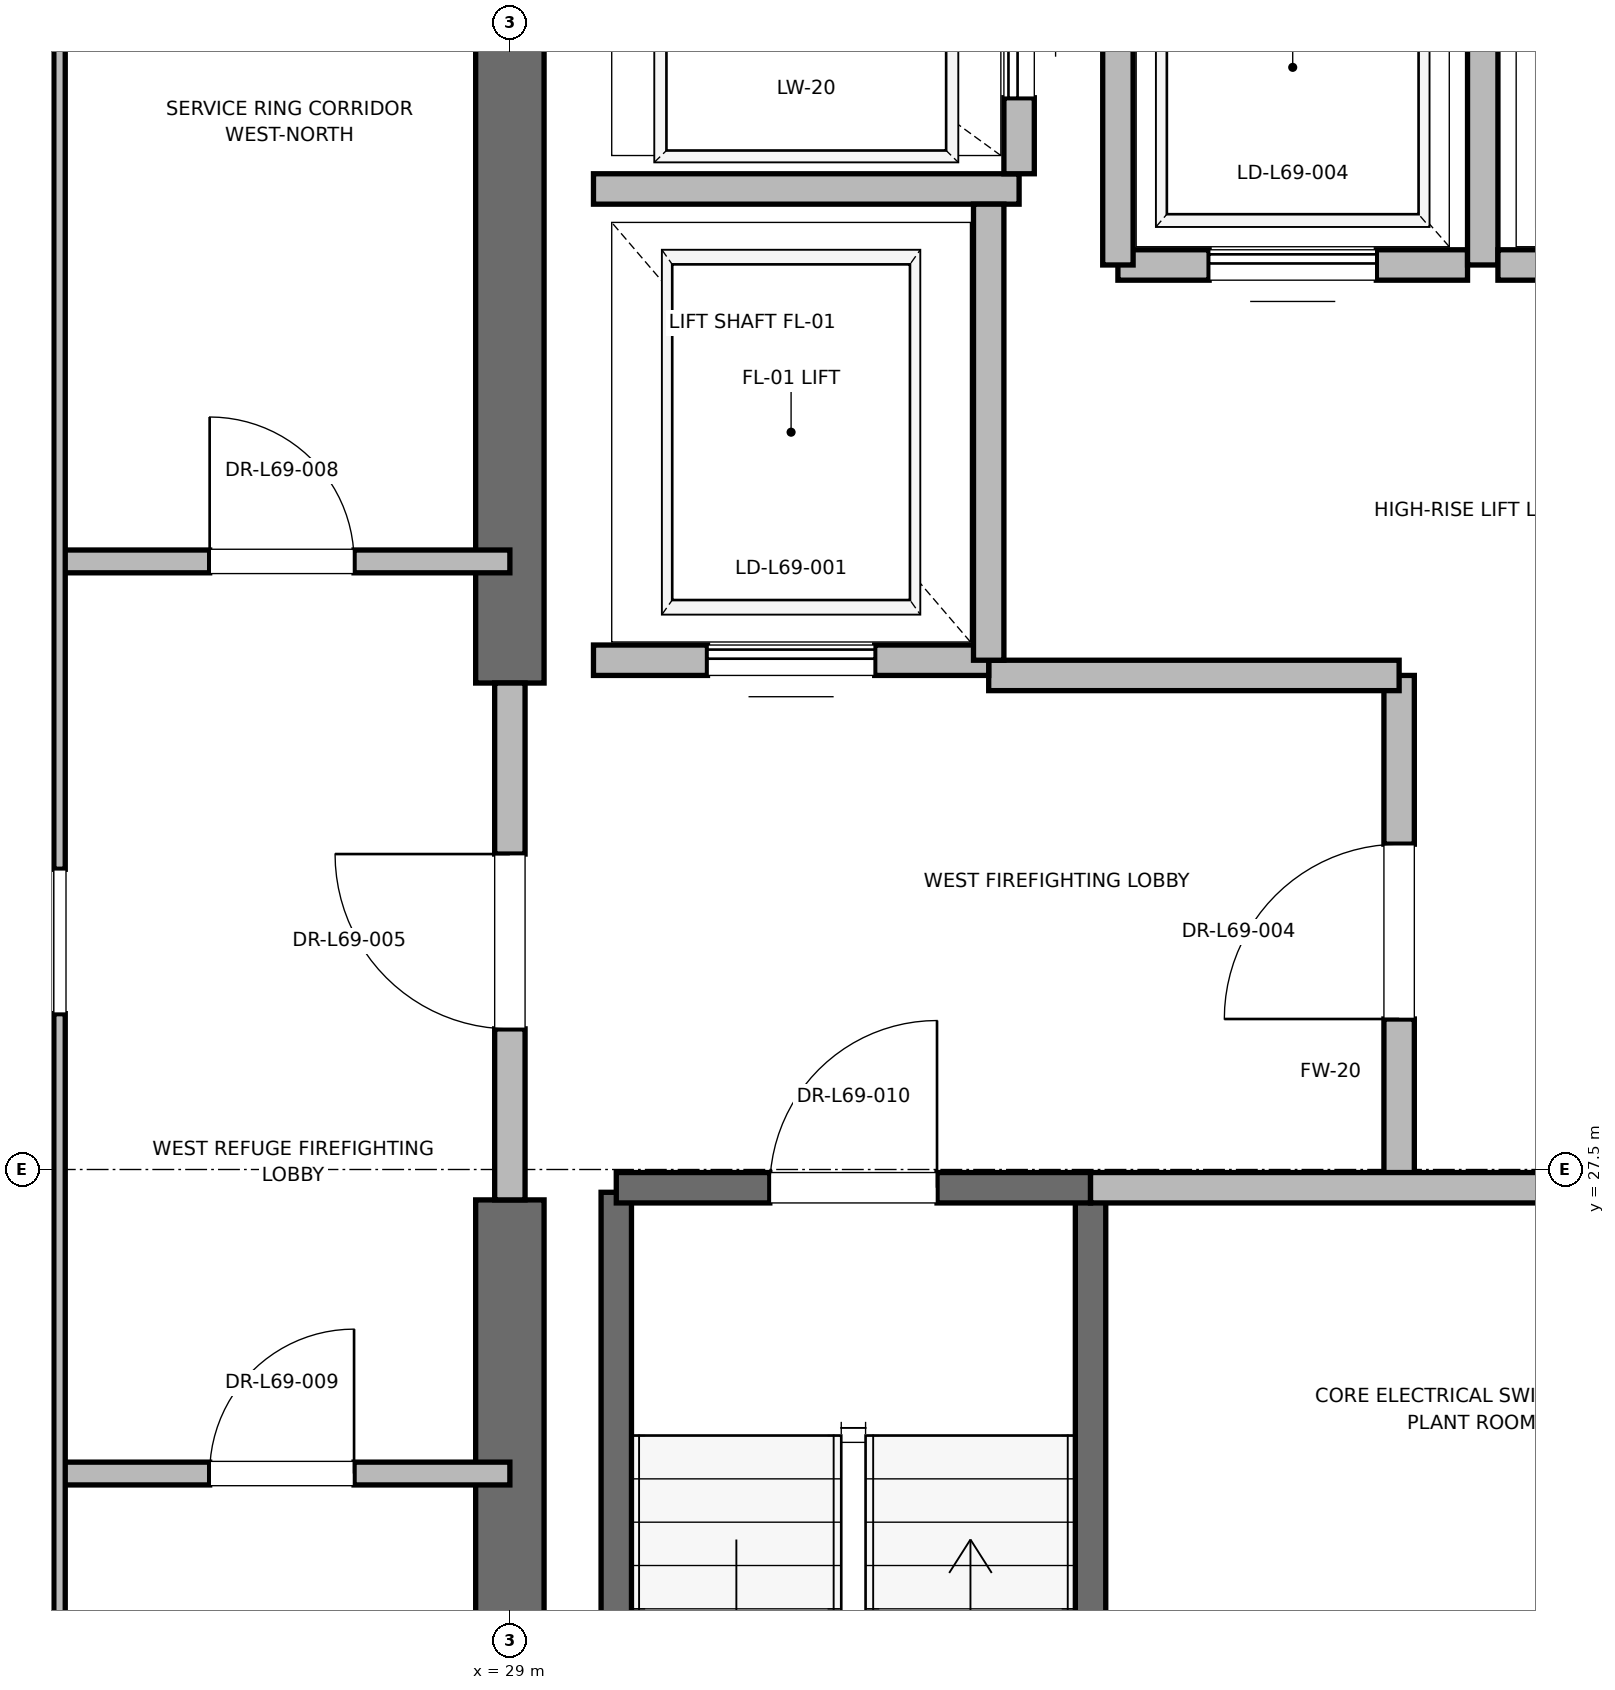
"""IFC4 building model, lengths in metres.
Left out: names, types, materials, properties, quantities, classifications, styles, units other than length and angle.
Written with IfcOpenShell. Run it as: python <this file> out.ifc"""

import sys

from ifc_helpers import new_model, si_unit, direction, frame, frame_2d, origin, place, context, subcontext, project, spatial, rectangle, extrude, element, fill, save


model = new_model("IFC4")
c1 = context("Model", 3, precision=1e-05, world=origin(), true_north=direction((0.0, 1.0)))
c2 = subcontext(c1, "Body", "Model", "MODEL_VIEW")
j1 = project(units=[si_unit("LENGTHUNIT", "METRE"), si_unit("PLANEANGLEUNIT", "RADIAN")], contexts=[c1])
p1 = place(None, origin())
s1 = spatial("IfcSite", under=j1, at=p1, CompositionType="ELEMENT")
p2 = place(p1, origin())
s2 = spatial("IfcBuilding", under=s1, at=p2, CompositionType="ELEMENT")
p3 = place(p2, frame((0.0, 0.0, 295.2)))
s3 = spatial("IfcBuildingStorey", under=s2, at=p3, CompositionType="ELEMENT", Elevation=295.2)
p4 = place(p3, frame((29.0, 18.5, 0.0), z_axis=(0.0, 0.0, 1.0), x_axis=(0.0, 1.0, 0.0)))
e1 = element("IfcWall", 1, at=p4, inside=s3, PredefinedType="SHEAR", context=c2, shape_type="SweptSolid", body=[
    extrude(rectangle(XDim=8.8, YDim=0.45, at=frame_2d((4.4, 0.0))), origin(), (0.0, 0.0, 1.0), 5.5),
])
p5 = place(p3, frame((29.0, 30.7, 0.0), z_axis=(0.0, 0.0, 1.0), x_axis=(0.0, 1.0, 0.0)))
e2 = element("IfcWall", 2, at=p5, inside=s3, PredefinedType="SHEAR", context=c2, shape_type="SweptSolid", body=[
    extrude(rectangle(XDim=5.8, YDim=0.45, at=frame_2d((2.9, 0.0))), origin(), (0.0, 0.0, 1.0), 5.5),
])
p6 = place(p3, frame((29.7, 19.2, 0.0), z_axis=(0.0, 0.0, 1.0), x_axis=(0.0, 1.0, 0.0)))
e3 = element("IfcWall", 3, at=p6, inside=s3, PredefinedType="SOLIDWALL", context=c2, shape_type="SweptSolid", body=[
    extrude(rectangle(XDim=8.15, YDim=0.2, at=frame_2d((4.075, 0.0))), origin(), (0.0, 0.0, 1.0), 5.5),
])
p7 = place(p3, frame((32.82, 18.6, 0.0), z_axis=(0.0, 0.0, 1.0), x_axis=(0.0, 1.0, 0.0)))
e4 = element("IfcWall", 4, at=p7, inside=s3, PredefinedType="SOLIDWALL", context=c2, shape_type="SweptSolid", body=[
    extrude(rectangle(XDim=8.78, YDim=0.2, at=frame_2d((4.39, 0.0))), origin(), (0.0, 0.0, 1.0), 5.5),
])
p8 = place(p3, frame((29.7, 27.38, 0.0), z_axis=(0.0, 0.0, 1.0), x_axis=(1.0, 0.0, 0.0)))
e5 = element("IfcWall", 5, at=p8, inside=s3, PredefinedType="SOLIDWALL", context=c2, shape_type="SweptSolid", body=[
    extrude(rectangle(XDim=3.12, YDim=0.2, at=frame_2d((1.56, 0.0))), origin(), (0.0, 0.0, 1.0), 5.5),
])
p9 = place(p8, frame((1.01, 0.0, 0.0)))
e6 = element("IfcOpeningElement", 6, at=p9, cuts=e5, PredefinedType="OPENING", context=c2, shape_type="SweptSolid", body=[
    extrude(rectangle(XDim=1.1, YDim=2.15, at=frame_2d((0.55, 1.075))), frame((0.0, 0.1, 0.0), z_axis=(0.0, -1.0, 0.0), x_axis=(1.0, 0.0, 0.0)), (0.0, 0.0, 1.0), 0.2),
])
p10 = place(p3, frame((34.85, 27.38, 0.0), z_axis=(0.0, 0.0, 1.0), x_axis=(0.0, 1.0, 0.0)))
e7 = element("IfcWall", 7, at=p10, inside=s3, PredefinedType="PARTITIONING", context=c2, shape_type="SweptSolid", body=[
    extrude(rectangle(XDim=3.37, YDim=0.2, at=frame_2d((1.685, 0.0))), origin(), (0.0, 0.0, 1.0), 5.5),
])
p11 = place(p10, frame((1.11, 0.0, 0.0)))
e8 = element("IfcOpeningElement", 8, at=p11, cuts=e7, PredefinedType="OPENING", context=c2, shape_type="SweptSolid", body=[
    extrude(rectangle(XDim=1.15, YDim=2.2, at=frame_2d((0.575, 1.1))), frame((0.0, 0.1, 0.0), z_axis=(0.0, -1.0, 0.0), x_axis=(1.0, 0.0, 0.0)), (0.0, 0.0, 1.0), 0.2),
])
p12 = place(p3, frame((29.0, 27.3, 0.0), z_axis=(0.0, 0.0, 1.0), x_axis=(0.0, 1.0, 0.0)))
e9 = element("IfcWall", 9, at=p12, inside=s3, PredefinedType="PARTITIONING", context=c2, shape_type="SweptSolid", body=[
    extrude(rectangle(XDim=3.4, YDim=0.2, at=frame_2d((1.7, 0.0))), origin(), (0.0, 0.0, 1.0), 4.58),
])
p13 = place(p12, frame((1.125, 0.0, 0.0)))
e10 = element("IfcOpeningElement", 10, at=p13, cuts=e9, PredefinedType="OPENING", context=c2, shape_type="SweptSolid", body=[
    extrude(rectangle(XDim=1.15, YDim=2.2, at=frame_2d((0.575, 1.1))), frame((0.0, 0.1, 0.0), z_axis=(0.0, -1.0, 0.0), x_axis=(1.0, 0.0, 0.0)), (0.0, 0.0, 1.0), 0.2),
])
p14 = place(p3, frame((32.82, 27.38, 0.0), z_axis=(0.0, 0.0, 1.0), x_axis=(1.0, 0.0, 0.0)))
e11 = element("IfcWall", 11, at=p14, inside=s3, PredefinedType="PARTITIONING", context=c2, shape_type="SweptSolid", body=[
    extrude(rectangle(XDim=5.62, YDim=0.2, at=frame_2d((2.81, 0.0))), origin(), (0.0, 0.0, 1.0), 5.5),
])
p15 = place(p3, frame((32.15, 30.75, 0.0), z_axis=(0.0, 0.0, 1.0), x_axis=(1.0, 0.0, 0.0)))
e12 = element("IfcWall", 12, at=p15, inside=s3, PredefinedType="PARTITIONING", context=c2, shape_type="SweptSolid", body=[
    extrude(rectangle(XDim=2.7, YDim=0.2, at=frame_2d((1.35, 0.0))), origin(), (0.0, 0.0, 1.0), 5.5),
])
p16 = place(p3, frame((29.55, 30.85, 0.0), z_axis=(0.0, 0.0, 1.0), x_axis=(1.0, 0.0, 0.0)))
e13 = element("IfcWall", 13, at=p16, inside=s3, PredefinedType="SOLIDWALL", context=c2, shape_type="SweptSolid", body=[
    extrude(rectangle(XDim=2.6, YDim=0.2, at=frame_2d((1.3, 0.0))), origin(), (0.0, 0.0, 1.0), 4.58),
])
p17 = place(p16, frame((0.75, 0.0, 0.0)))
e14 = element("IfcOpeningElement", 14, at=p17, cuts=e13, PredefinedType="OPENING", context=c2, shape_type="SweptSolid", body=[
    extrude(rectangle(XDim=1.1, YDim=2.2, at=frame_2d((0.55, 1.1))), frame((0.0, 0.1, 0.0), z_axis=(0.0, -1.0, 0.0), x_axis=(1.0, 0.0, 0.0)), (0.0, 0.0, 1.0), 0.2),
])
p18 = place(p3, frame((29.55, 33.95, 0.0), z_axis=(0.0, 0.0, 1.0), x_axis=(1.0, 0.0, 0.0)))
e15 = element("IfcWall", 15, at=p18, inside=s3, PredefinedType="SOLIDWALL", context=c2, shape_type="SweptSolid", body=[
    extrude(rectangle(XDim=2.8, YDim=0.2, at=frame_2d((1.4, 0.0))), origin(), (0.0, 0.0, 1.0), 5.5),
])
p19 = place(p3, frame((32.15, 30.85, 0.0), z_axis=(0.0, 0.0, 1.0), x_axis=(0.0, 1.0, 0.0)))
e16 = element("IfcWall", 16, at=p19, inside=s3, PredefinedType="SOLIDWALL", context=c2, shape_type="SweptSolid", body=[
    extrude(rectangle(XDim=3.0, YDim=0.2, at=frame_2d((1.5, 0.0))), origin(), (0.0, 0.0, 1.0), 5.5),
])
p20 = place(p3, frame((32.35, 34.05, 0.0), z_axis=(0.0, 0.0, 1.0), x_axis=(0.0, 1.0, 0.0)))
e17 = element("IfcWall", 17, at=p20, inside=s3, PredefinedType="SOLIDWALL", context=c2, shape_type="SweptSolid", body=[
    extrude(rectangle(XDim=2.1, YDim=0.2, at=frame_2d((1.05, 0.0))), origin(), (0.0, 0.0, 1.0), 5.5),
])
p21 = place(p20, frame((0.5, 0.0, 0.0)))
e18 = element("IfcOpeningElement", 18, at=p21, cuts=e17, PredefinedType="OPENING", context=c2, shape_type="SweptSolid", body=[
    extrude(rectangle(XDim=1.1, YDim=2.2, at=frame_2d((0.55, 1.1))), frame((0.0, 0.1, 0.0), z_axis=(0.0, -1.0, 0.0), x_axis=(1.0, 0.0, 0.0)), (0.0, 0.0, 1.0), 0.2),
])
p22 = place(p3, frame((33.0, 33.45, 0.0), z_axis=(0.0, 0.0, 1.0), x_axis=(1.0, 0.0, 0.0)))
e19 = element("IfcWall", 19, at=p22, inside=s3, PredefinedType="SOLIDWALL", context=c2, shape_type="SweptSolid", body=[
    extrude(rectangle(XDim=2.3, YDim=0.2, at=frame_2d((1.15, 0.0))), origin(), (0.0, 0.0, 1.0), 5.5),
])
p23 = place(p22, frame((0.6, 0.0, 0.0)))
e20 = element("IfcOpeningElement", 20, at=p23, cuts=e19, PredefinedType="OPENING", context=c2, shape_type="SweptSolid", body=[
    extrude(rectangle(XDim=1.1, YDim=2.2, at=frame_2d((0.55, 1.1))), frame((0.0, 0.1, 0.0), z_axis=(0.0, -1.0, 0.0), x_axis=(1.0, 0.0, 0.0)), (0.0, 0.0, 1.0), 0.2),
])
p24 = place(p3, frame((33.0, 36.05, 0.0), z_axis=(0.0, 0.0, 1.0), x_axis=(0.0, -1.0, 0.0)))
e21 = element("IfcWall", 21, at=p24, inside=s3, PredefinedType="SOLIDWALL", context=c2, shape_type="SweptSolid", body=[
    extrude(rectangle(XDim=2.6, YDim=0.2, at=frame_2d((1.3, 0.0))), origin(), (0.0, 0.0, 1.0), 5.5),
])
p25 = place(p3, frame((35.4, 33.45, 0.0), z_axis=(0.0, 0.0, 1.0), x_axis=(0.0, 1.0, 0.0)))
e22 = element("IfcWall", 22, at=p25, inside=s3, PredefinedType="SOLIDWALL", context=c2, shape_type="SweptSolid", body=[
    extrude(rectangle(XDim=2.6, YDim=0.2, at=frame_2d((1.3, 0.0))), origin(), (0.0, 0.0, 1.0), 4.58),
])
p26 = place(p3, frame((35.5, 33.45, 0.0), z_axis=(0.0, 0.0, 1.0), x_axis=(1.0, 0.0, 0.0)))
e23 = element("IfcWall", 23, at=p26, inside=s3, PredefinedType="SOLIDWALL", context=c2, shape_type="SweptSolid", body=[
    extrude(rectangle(XDim=2.3, YDim=0.2, at=frame_2d((1.15, 0.0))), origin(), (0.0, 0.0, 1.0), 5.5),
])
p27 = place(p26, frame((0.6, 0.0, 0.0)))
e24 = element("IfcOpeningElement", 24, at=p27, cuts=e23, PredefinedType="OPENING", context=c2, shape_type="SweptSolid", body=[
    extrude(rectangle(XDim=1.1, YDim=2.2, at=frame_2d((0.55, 1.1))), frame((0.0, 0.1, 0.0), z_axis=(0.0, -1.0, 0.0), x_axis=(1.0, 0.0, 0.0)), (0.0, 0.0, 1.0), 0.2),
])
p28 = place(p3, frame((26.0, 25.5, 0.0), z_axis=(0.0, 0.0, 1.0), x_axis=(1.0, 0.0, 0.0)))
e25 = element("IfcWall", 25, at=p28, inside=s3, PredefinedType="PARTITIONING", context=c2, shape_type="SweptSolid", body=[
    extrude(rectangle(XDim=3.0, YDim=0.15, at=frame_2d((1.5, 0.0))), origin(), (0.0, 0.0, 1.0), 2.85),
])
p29 = place(p28, frame((1.025, 0.0, 0.0)))
e26 = element("IfcOpeningElement", 26, at=p29, cuts=e25, PredefinedType="OPENING", context=c2, shape_type="SweptSolid", body=[
    extrude(rectangle(XDim=0.95, YDim=2.15, at=frame_2d((0.475, 1.075))), frame((0.0, 0.075, 0.0), z_axis=(0.0, -1.0, 0.0), x_axis=(1.0, 0.0, 0.0)), (0.0, 0.0, 1.0), 0.15),
])
p30 = place(p3, frame((26.0, 31.5, 0.0), z_axis=(0.0, 0.0, 1.0), x_axis=(1.0, 0.0, 0.0)))
e27 = element("IfcWall", 27, at=p30, inside=s3, PredefinedType="PARTITIONING", context=c2, shape_type="SweptSolid", body=[
    extrude(rectangle(XDim=3.0, YDim=0.15, at=frame_2d((1.5, 0.0))), origin(), (0.0, 0.0, 1.0), 2.85),
])
p31 = place(p30, frame((1.025, 0.0, 0.0)))
e28 = element("IfcOpeningElement", 28, at=p31, cuts=e27, PredefinedType="OPENING", context=c2, shape_type="SweptSolid", body=[
    extrude(rectangle(XDim=0.95, YDim=2.15, at=frame_2d((0.475, 1.075))), frame((0.0, 0.075, 0.0), z_axis=(0.0, -1.0, 0.0), x_axis=(1.0, 0.0, 0.0)), (0.0, 0.0, 1.0), 0.15),
])
p32 = place(p3, frame((26.0, 24.57, 0.0), z_axis=(0.0, 0.0, 1.0), x_axis=(0.0, 1.0, 0.0)))
e29 = element("IfcWall", 29, at=p32, inside=s3, PredefinedType="PARTITIONING", context=c2, shape_type="SweptSolid", body=[
    extrude(rectangle(XDim=11.73, YDim=0.15, at=frame_2d((5.865, 0.0))), origin(), (0.0, 0.0, 1.0), 2.85),
])
p33 = place(p32, frame((3.955, 0.0, 0.0)))
e30 = element("IfcOpeningElement", 30, at=p33, cuts=e29, PredefinedType="OPENING", context=c2, shape_type="SweptSolid", body=[
    extrude(rectangle(XDim=0.95, YDim=2.15, at=frame_2d((0.475, 1.075))), frame((0.0, 0.075, 0.0), z_axis=(0.0, -1.0, 0.0), x_axis=(1.0, 0.0, 0.0)), (0.0, 0.0, 1.0), 0.15),
])
p34 = place(p9, origin())
e31 = element("IfcDoor", 31, at=p34, inside=s3, OperationType="SINGLE_SWING_RIGHT", PredefinedType="DOOR", context=c2, shape_type="SweptSolid", body=[
    extrude(rectangle(XDim=1.1, YDim=2.15, at=frame_2d((0.55, 1.075))), frame((0.0, 0.025, 0.0), z_axis=(0.0, -1.0, 0.0), x_axis=(1.0, 0.0, 0.0)), (0.0, 0.0, 1.0), 0.05),
])
fill(e6, e31)
p35 = place(p11, origin())
e32 = element("IfcDoor", 32, at=p35, inside=s3, OperationType="SINGLE_SWING_LEFT", PredefinedType="DOOR", context=c2, shape_type="SweptSolid", body=[
    extrude(rectangle(XDim=1.15, YDim=2.2, at=frame_2d((0.575, 1.1))), frame((0.0, 0.025, 0.0), z_axis=(0.0, -1.0, 0.0), x_axis=(1.0, 0.0, 0.0)), (0.0, 0.0, 1.0), 0.05),
])
fill(e8, e32)
p36 = place(p13, origin())
e33 = element("IfcDoor", 33, at=p36, inside=s3, OperationType="SINGLE_SWING_RIGHT", PredefinedType="DOOR", context=c2, shape_type="SweptSolid", body=[
    extrude(rectangle(XDim=1.15, YDim=2.2, at=frame_2d((0.575, 1.1))), frame((0.0, 0.025, 0.0), z_axis=(0.0, -1.0, 0.0), x_axis=(1.0, 0.0, 0.0)), (0.0, 0.0, 1.0), 0.05),
])
fill(e10, e33)
p37 = place(p17, origin())
e34 = element("IfcDoor", 34, at=p37, inside=s3, OperationType="SLIDING_TO_RIGHT", PredefinedType="DOOR", context=c2, shape_type="SweptSolid", body=[
    extrude(rectangle(XDim=1.1, YDim=2.2, at=frame_2d((0.55, 1.1))), frame((0.0, 0.025, 0.0), z_axis=(0.0, -1.0, 0.0), x_axis=(1.0, 0.0, 0.0)), (0.0, 0.0, 1.0), 0.05),
])
fill(e14, e34)
p38 = place(p21, origin())
e35 = element("IfcDoor", 35, at=p38, inside=s3, OperationType="SLIDING_TO_RIGHT", PredefinedType="DOOR", context=c2, shape_type="SweptSolid", body=[
    extrude(rectangle(XDim=1.1, YDim=2.2, at=frame_2d((0.55, 1.1))), frame((0.0, 0.025, 0.0), z_axis=(0.0, -1.0, 0.0), x_axis=(1.0, 0.0, 0.0)), (0.0, 0.0, 1.0), 0.05),
])
fill(e18, e35)
p39 = place(p23, origin())
e36 = element("IfcDoor", 36, at=p39, inside=s3, OperationType="SLIDING_TO_RIGHT", PredefinedType="DOOR", context=c2, shape_type="SweptSolid", body=[
    extrude(rectangle(XDim=1.1, YDim=2.2, at=frame_2d((0.55, 1.1))), frame((0.0, 0.025, 0.0), z_axis=(0.0, -1.0, 0.0), x_axis=(1.0, 0.0, 0.0)), (0.0, 0.0, 1.0), 0.05),
])
fill(e20, e36)
p40 = place(p29, origin())
e37 = element("IfcDoor", 37, at=p40, inside=s3, OperationType="SINGLE_SWING_RIGHT", PredefinedType="DOOR", context=c2, shape_type="SweptSolid", body=[
    extrude(rectangle(XDim=0.95, YDim=2.15, at=frame_2d((0.475, 1.075))), frame((0.0, 0.025, 0.0), z_axis=(0.0, -1.0, 0.0), x_axis=(1.0, 0.0, 0.0)), (0.0, 0.0, 1.0), 0.05),
])
fill(e26, e37)
p41 = place(p31, origin())
e38 = element("IfcDoor", 38, at=p41, inside=s3, OperationType="SINGLE_SWING_LEFT", PredefinedType="DOOR", context=c2, shape_type="SweptSolid", body=[
    extrude(rectangle(XDim=0.95, YDim=2.15, at=frame_2d((0.475, 1.075))), frame((0.0, 0.025, 0.0), z_axis=(0.0, -1.0, 0.0), x_axis=(1.0, 0.0, 0.0)), (0.0, 0.0, 1.0), 0.05),
])
fill(e28, e38)
p42 = place(p33, origin())
e39 = element("IfcDoor", 39, at=p42, inside=s3, OperationType="SINGLE_SWING_LEFT", PredefinedType="DOOR", context=c2, shape_type="SweptSolid", body=[
    extrude(rectangle(XDim=0.95, YDim=2.15, at=frame_2d((0.475, 1.075))), frame((0.0, 0.025, 0.0), z_axis=(0.0, -1.0, 0.0), x_axis=(1.0, 0.0, 0.0)), (0.0, 0.0, 1.0), 0.05),
])
fill(e30, e39)
save(model, sys.argv[1])
